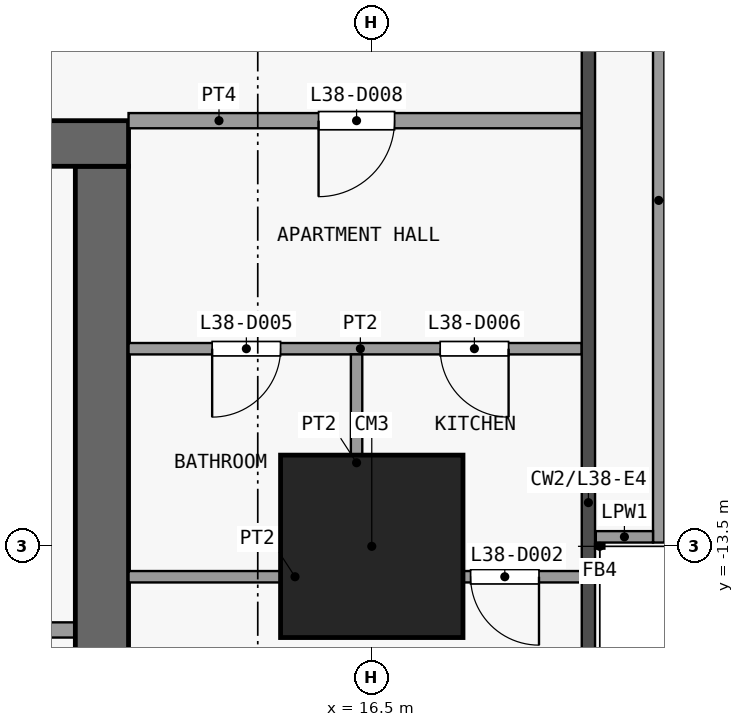
"""IFC4 building model, lengths in metres.
Left out: names, types, materials, properties, quantities, classifications, styles, units other than length and angle.
Written with IfcOpenShell. Run it as: python <this file> out.ifc"""

import sys

from ifc_helpers import new_model, si_unit, direction, frame, frame_2d, origin, origin_2d, place, context, subcontext, project, spatial, rectangle, extrude, element, fill, save


model = new_model("IFC4")
c1 = context("Model", 3, precision=1e-05, world=origin(), true_north=direction((0.0, 1.0)))
c2 = subcontext(c1, "Body", "Model", "MODEL_VIEW")
j1 = project(units=[si_unit("LENGTHUNIT", "METRE"), si_unit("PLANEANGLEUNIT", "RADIAN")], contexts=[c1])
p1 = place(None, origin())
s1 = spatial("IfcSite", under=j1, at=p1, CompositionType="ELEMENT")
p2 = place(p1, origin())
s2 = spatial("IfcBuilding", under=s1, at=p2, CompositionType="ELEMENT")
p3 = place(p2, frame((0.0, 0.0, 156.5)))
s3 = spatial("IfcBuildingStorey", under=s2, at=p3, CompositionType="ELEMENT", Elevation=156.5)
p4 = place(p3, frame((16.5, -13.5, 0.0), z_axis=(0.0, 0.0, 1.0), x_axis=(1.0, 0.0, 0.0)))
e1 = element("IfcColumn", 1, at=p4, inside=s3, PredefinedType="COLUMN", context=c2, shape_type="SweptSolid", body=[
    extrude(rectangle(XDim=2.4, YDim=2.4, at=origin_2d()), origin(), (0.0, 0.0, 1.0), 3.6),
])
p5 = place(p3, frame((-13.3, -8.2, 0.0), z_axis=(0.0, 0.0, 1.0), x_axis=(1.0, 0.0, 0.0)))
e2 = element("IfcWall", 2, at=p5, inside=s3, PredefinedType="SHEAR", context=c2, shape_type="SweptSolid", body=[
    extrude(rectangle(XDim=26.6, YDim=0.6, at=frame_2d((13.3, 0.0))), origin(), (0.0, 0.0, 1.0), 3.3),
])
p6 = place(p5, frame((7.6, 0.0, 0.0)))
e3 = element("IfcOpeningElement", 3, at=p6, cuts=e2, PredefinedType="OPENING", context=c2, shape_type="SweptSolid", body=[
    extrude(rectangle(XDim=1.8, YDim=2.1, at=frame_2d((0.9, 1.05))), frame((0.0, 0.31, 0.0), z_axis=(0.0, -1.0, 0.0), x_axis=(1.0, 0.0, 0.0)), (0.0, 0.0, 1.0), 0.62),
])
p7 = place(p5, frame((17.2, 0.0, 0.0)))
e4 = element("IfcOpeningElement", 4, at=p7, cuts=e2, PredefinedType="OPENING", context=c2, shape_type="SweptSolid", body=[
    extrude(rectangle(XDim=1.8, YDim=2.1, at=frame_2d((0.9, 1.05))), frame((0.0, 0.31, 0.0), z_axis=(0.0, -1.0, 0.0), x_axis=(1.0, 0.0, 0.0)), (0.0, 0.0, 1.0), 0.62),
])
p8 = place(p5, frame((1.525, 0.0, 0.0)))
e5 = element("IfcOpeningElement", 5, at=p8, cuts=e2, PredefinedType="OPENING", context=c2, shape_type="SweptSolid", body=[
    extrude(rectangle(XDim=1.2, YDim=2.1, at=frame_2d((0.6, 1.05))), frame((0.0, 0.31, 0.0), z_axis=(0.0, -1.0, 0.0), x_axis=(1.0, 0.0, 0.0)), (0.0, 0.0, 1.0), 0.62),
])
p9 = place(p5, frame((23.175, 0.0, 0.0)))
e6 = element("IfcOpeningElement", 6, at=p9, cuts=e2, PredefinedType="OPENING", context=c2, shape_type="SweptSolid", body=[
    extrude(rectangle(XDim=0.9, YDim=2.1, at=frame_2d((0.45, 1.05))), frame((0.0, 0.31, 0.0), z_axis=(0.0, -1.0, 0.0), x_axis=(1.0, 0.0, 0.0)), (0.0, 0.0, 1.0), 0.62),
])
p10 = place(p3, frame((12.95, -24.6, 0.0), z_axis=(0.0, 0.0, 1.0), x_axis=(0.0, 1.0, 0.0)))
e7 = element("IfcWall", 7, at=p10, inside=s3, PredefinedType="SHEAR", context=c2, shape_type="SweptSolid", body=[
    extrude(rectangle(XDim=16.1, YDim=0.7, at=frame_2d((8.05, 0.0))), origin(), (0.0, 0.0, 1.0), 3.3),
])
p11 = place(p3, frame((11.15, -14.6, 0.0), z_axis=(0.0, 0.0, 1.0), x_axis=(1.0, 0.0, 0.0)))
e8 = element("IfcWall", 8, at=p11, inside=s3, PredefinedType="PARTITIONING", context=c2, shape_type="SweptSolid", body=[
    extrude(rectangle(XDim=1.45, YDim=0.2, at=frame_2d((0.725, 0.0))), origin(), (0.0, 0.0, 1.0), 3.3),
])
p12 = place(p3, frame((20.275, -4.448, 0.0), z_axis=(0.0, 0.0, 1.0), x_axis=(0.0, -1.0, 0.0)))
e9 = element("IfcWall", 9, at=p12, inside=s3, PredefinedType="PARAPET", context=c2, shape_type="SweptSolid", body=[
    extrude(rectangle(XDim=9.002, YDim=0.15, at=frame_2d((4.501, 0.0))), origin(), (0.0, 0.0, 1.0), 1.15),
])
p13 = place(p3, frame((20.2, -13.375, 0.0), z_axis=(0.0, 0.0, 1.0), x_axis=(-1.0, 0.0, 0.0)))
e10 = element("IfcWall", 10, at=p13, inside=s3, PredefinedType="PARAPET", context=c2, shape_type="SweptSolid", body=[
    extrude(rectangle(XDim=0.752, YDim=0.15, at=frame_2d((0.376, 0.0))), origin(), (0.0, 0.0, 1.0), 1.15),
])
p14 = place(p3, frame((13.3, -13.9, 0.0), z_axis=(0.0, 0.0, 1.0), x_axis=(1.0, 0.0, 0.0)))
e11 = element("IfcWall", 11, at=p14, inside=s3, PredefinedType="PARTITIONING", context=c2, shape_type="SweptSolid", body=[
    extrude(rectangle(XDim=5.962, YDim=0.15, at=frame_2d((2.981, 0.0))), origin(), (0.0, 0.0, 1.0), 3.3),
])
p15 = place(p14, frame((4.5, 0.0, 0.0)))
e12 = element("IfcOpeningElement", 12, at=p15, cuts=e11, PredefinedType="OPENING", context=c2, shape_type="SweptSolid", body=[
    extrude(rectangle(XDim=0.9, YDim=2.1, at=frame_2d((0.45, 1.05))), frame((0.0, 0.085, 0.0), z_axis=(0.0, -1.0, 0.0), x_axis=(1.0, 0.0, 0.0)), (0.0, 0.0, 1.0), 0.17),
])
p16 = place(p3, frame((13.3, -10.9, 0.0), z_axis=(0.0, 0.0, 1.0), x_axis=(1.0, 0.0, 0.0)))
e13 = element("IfcWall", 13, at=p16, inside=s3, PredefinedType="PARTITIONING", context=c2, shape_type="SweptSolid", body=[
    extrude(rectangle(XDim=5.962, YDim=0.15, at=frame_2d((2.981, 0.0))), origin(), (0.0, 0.0, 1.0), 3.3),
])
p17 = place(p16, frame((1.1, 0.0, 0.0)))
e14 = element("IfcOpeningElement", 14, at=p17, cuts=e13, PredefinedType="OPENING", context=c2, shape_type="SweptSolid", body=[
    extrude(rectangle(XDim=0.9, YDim=2.1, at=frame_2d((0.45, 1.05))), frame((0.0, 0.085, 0.0), z_axis=(0.0, -1.0, 0.0), x_axis=(1.0, 0.0, 0.0)), (0.0, 0.0, 1.0), 0.17),
])
p18 = place(p16, frame((4.1, 0.0, 0.0)))
e15 = element("IfcOpeningElement", 15, at=p18, cuts=e13, PredefinedType="OPENING", context=c2, shape_type="SweptSolid", body=[
    extrude(rectangle(XDim=0.9, YDim=2.1, at=frame_2d((0.45, 1.05))), frame((0.0, 0.085, 0.0), z_axis=(0.0, -1.0, 0.0), x_axis=(1.0, 0.0, 0.0)), (0.0, 0.0, 1.0), 0.17),
])
p19 = place(p3, frame((13.3, -7.9, 0.0), z_axis=(0.0, 0.0, 1.0), x_axis=(1.0, 0.0, 0.0)))
e16 = element("IfcWall", 16, at=p19, inside=s3, PredefinedType="PARTITIONING", context=c2, shape_type="SweptSolid", body=[
    extrude(rectangle(XDim=5.962, YDim=0.2, at=frame_2d((2.981, 0.0))), origin(), (0.0, 0.0, 1.0), 3.3),
])
p20 = place(p19, frame((2.5, 0.0, 0.0)))
e17 = element("IfcOpeningElement", 17, at=p20, cuts=e16, PredefinedType="OPENING", context=c2, shape_type="SweptSolid", body=[
    extrude(rectangle(XDim=1.0, YDim=2.1, at=frame_2d((0.5, 1.05))), frame((0.0, 0.11, 0.0), z_axis=(0.0, -1.0, 0.0), x_axis=(1.0, 0.0, 0.0)), (0.0, 0.0, 1.0), 0.22),
])
p21 = place(p3, frame((16.3, -13.825, 0.0), z_axis=(0.0, 0.0, 1.0), x_axis=(0.0, 1.0, 0.0)))
e18 = element("IfcWall", 18, at=p21, inside=s3, PredefinedType="PARTITIONING", context=c2, shape_type="SweptSolid", body=[
    extrude(rectangle(XDim=2.85, YDim=0.15, at=frame_2d((1.425, 0.0))), origin(), (0.0, 0.0, 1.0), 3.3),
])
p22 = place(p15, origin())
e19 = element("IfcDoor", 19, at=p22, inside=s3, OperationType="SINGLE_SWING_RIGHT", PredefinedType="DOOR", context=c2, shape_type="SweptSolid", body=[
    extrude(rectangle(XDim=0.9, YDim=2.1, at=frame_2d((0.45, 1.05))), frame((0.0, 0.025, 0.0), z_axis=(0.0, -1.0, 0.0), x_axis=(1.0, 0.0, 0.0)), (0.0, 0.0, 1.0), 0.05),
])
fill(e12, e19)
p23 = place(p17, origin())
e20 = element("IfcDoor", 20, at=p23, inside=s3, OperationType="SINGLE_SWING_LEFT", PredefinedType="DOOR", context=c2, shape_type="SweptSolid", body=[
    extrude(rectangle(XDim=0.9, YDim=2.1, at=frame_2d((0.45, 1.05))), frame((0.0, 0.025, 0.0), z_axis=(0.0, -1.0, 0.0), x_axis=(1.0, 0.0, 0.0)), (0.0, 0.0, 1.0), 0.05),
])
fill(e14, e20)
p24 = place(p18, origin())
e21 = element("IfcDoor", 21, at=p24, inside=s3, OperationType="SINGLE_SWING_RIGHT", PredefinedType="DOOR", context=c2, shape_type="SweptSolid", body=[
    extrude(rectangle(XDim=0.9, YDim=2.1, at=frame_2d((0.45, 1.05))), frame((0.0, 0.025, 0.0), z_axis=(0.0, -1.0, 0.0), x_axis=(1.0, 0.0, 0.0)), (0.0, 0.0, 1.0), 0.05),
])
fill(e15, e21)
p25 = place(p20, origin())
e22 = element("IfcDoor", 22, at=p25, inside=s3, OperationType="SINGLE_SWING_LEFT", PredefinedType="DOOR", context=c2, shape_type="SweptSolid", body=[
    extrude(rectangle(XDim=1.0, YDim=2.1, at=frame_2d((0.5, 1.05))), frame((0.0, 0.025, 0.0), z_axis=(0.0, -1.0, 0.0), x_axis=(1.0, 0.0, 0.0)), (0.0, 0.0, 1.0), 0.05),
])
fill(e17, e22)
save(model, sys.argv[1])
